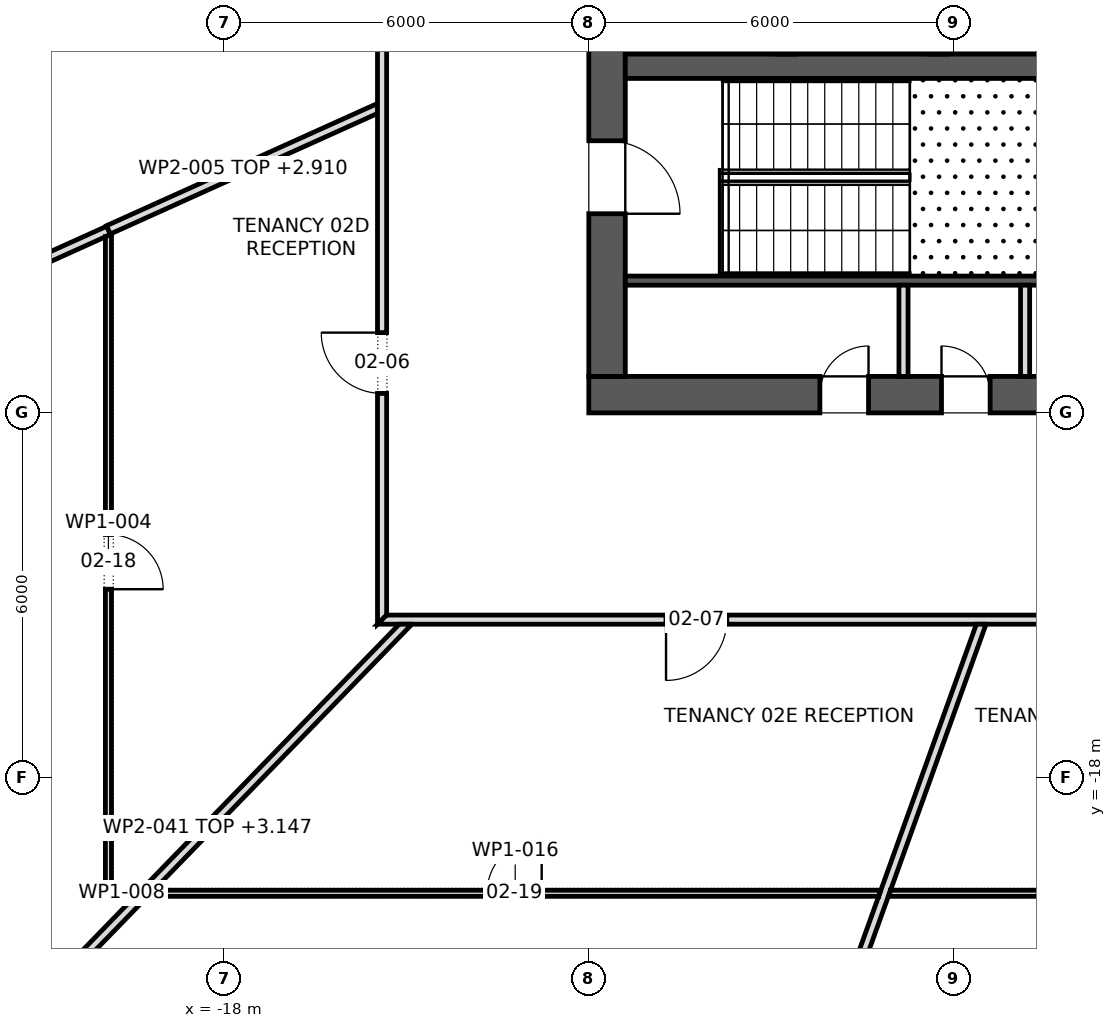
"""IFC4 building model, lengths in metres.
Left out: names, types, materials, properties, quantities, classifications, styles, units other than length and angle.
Written with IfcOpenShell. Run it as: python <this file> out.ifc"""

import sys

from ifc_helpers import new_model, si_unit, direction, frame, frame_2d, origin, place, context, subcontext, project, spatial, polyline, rectangle, outline, extrude, element, fill, save


model = new_model("IFC4")
c1 = context("Model", 3, precision=1e-05, world=origin(), true_north=direction((0.0, 1.0)))
c2 = subcontext(c1, "Body", "Model", "MODEL_VIEW")
j1 = project(units=[si_unit("LENGTHUNIT", "METRE"), si_unit("PLANEANGLEUNIT", "RADIAN")], contexts=[c1])
p1 = place(None, origin())
s1 = spatial("IfcSite", under=j1, at=p1, CompositionType="ELEMENT")
p2 = place(p1, origin())
s2 = spatial("IfcBuilding", under=s1, at=p2, CompositionType="ELEMENT")
p3 = place(p2, frame((0.0, 0.0, 44.5)))
s3 = spatial("IfcBuildingStorey", under=s2, at=p3, CompositionType="ELEMENT", Elevation=44.5)
p4 = place(p3, frame((-12.0, -11.7, 0.0), z_axis=(0.0, 0.0, 1.0), x_axis=(1.0, 0.0, 0.0)))
e1 = element("IfcWall", 1, at=p4, inside=s3, PredefinedType="SHEAR", context=c2, shape_type="SweptSolid", body=[
    extrude(rectangle(XDim=24.0, YDim=0.6, at=frame_2d((12.0, 0.0))), origin(), (0.0, 0.0, 1.0), 4.2),
])
p5 = place(p4, frame((9.975, 0.0, 0.0)))
e2 = element("IfcOpeningElement", 2, at=p5, cuts=e1, PredefinedType="OPENING", context=c2, shape_type="SweptSolid", body=[
    extrude(rectangle(XDim=0.9, YDim=2.1, at=frame_2d((0.45, 1.05))), frame((0.0, 0.312, 0.0), z_axis=(0.0, -1.0, 0.0), x_axis=(1.0, 0.0, 0.0)), (0.0, 0.0, 1.0), 0.624),
])
p6 = place(p4, frame((3.8, 0.0, 0.0)))
e3 = element("IfcOpeningElement", 3, at=p6, cuts=e1, PredefinedType="OPENING", context=c2, shape_type="SweptSolid", body=[
    extrude(rectangle(XDim=0.8, YDim=2.1, at=frame_2d((0.4, 1.05))), frame((0.0, 0.312, 0.0), z_axis=(0.0, -1.0, 0.0), x_axis=(1.0, 0.0, 0.0)), (0.0, 0.0, 1.0), 0.624),
])
p7 = place(p4, frame((5.8, 0.0, 0.0)))
e4 = element("IfcOpeningElement", 4, at=p7, cuts=e1, PredefinedType="OPENING", context=c2, shape_type="SweptSolid", body=[
    extrude(rectangle(XDim=0.8, YDim=2.1, at=frame_2d((0.4, 1.05))), frame((0.0, 0.312, 0.0), z_axis=(0.0, -1.0, 0.0), x_axis=(1.0, 0.0, 0.0)), (0.0, 0.0, 1.0), 0.624),
])
p8 = place(p4, frame((7.5, 0.0, 0.0)))
e5 = element("IfcOpeningElement", 5, at=p8, cuts=e1, PredefinedType="OPENING", context=c2, shape_type="SweptSolid", body=[
    extrude(rectangle(XDim=0.8, YDim=2.1, at=frame_2d((0.4, 1.05))), frame((0.0, 0.312, 0.0), z_axis=(0.0, -1.0, 0.0), x_axis=(1.0, 0.0, 0.0)), (0.0, 0.0, 1.0), 0.624),
])
p9 = place(p4, frame((15.85, 0.0, 0.0)))
e6 = element("IfcOpeningElement", 6, at=p9, cuts=e1, PredefinedType="OPENING", context=c2, shape_type="SweptSolid", body=[
    extrude(rectangle(XDim=0.8, YDim=2.1, at=frame_2d((0.4, 1.05))), frame((0.0, 0.312, 0.0), z_axis=(0.0, -1.0, 0.0), x_axis=(1.0, 0.0, 0.0)), (0.0, 0.0, 1.0), 0.624),
])
p10 = place(p3, frame((-11.7, -11.4, 0.0), z_axis=(0.0, 0.0, 1.0), x_axis=(0.0, 1.0, 0.0)))
e7 = element("IfcWall", 7, at=p10, inside=s3, PredefinedType="SHEAR", context=c2, shape_type="SweptSolid", body=[
    extrude(rectangle(XDim=22.8, YDim=0.6, at=frame_2d((11.4, 0.0))), origin(), (0.0, 0.0, 1.0), 4.2),
])
p11 = place(p10, frame((10.2, 0.0, 0.0)))
e8 = element("IfcOpeningElement", 8, at=p11, cuts=e7, PredefinedType="OPENING", context=c2, shape_type="SweptSolid", body=[
    extrude(rectangle(XDim=2.4, YDim=2.1, at=frame_2d((1.2, 1.05))), frame((0.0, 0.312, 0.0), z_axis=(0.0, -1.0, 0.0), x_axis=(1.0, 0.0, 0.0)), (0.0, 0.0, 1.0), 0.624),
])
p12 = place(p10, frame((18.925, 0.0, 0.0)))
e9 = element("IfcOpeningElement", 9, at=p12, cuts=e7, PredefinedType="OPENING", context=c2, shape_type="SweptSolid", body=[
    extrude(rectangle(XDim=1.2, YDim=2.1, at=frame_2d((0.6, 1.05))), frame((0.0, 0.312, 0.0), z_axis=(0.0, -1.0, 0.0), x_axis=(1.0, 0.0, 0.0)), (0.0, 0.0, 1.0), 0.624),
])
p13 = place(p10, frame((2.675, 0.0, 0.0)))
e10 = element("IfcOpeningElement", 10, at=p13, cuts=e7, PredefinedType="OPENING", context=c2, shape_type="SweptSolid", body=[
    extrude(rectangle(XDim=1.2, YDim=2.1, at=frame_2d((0.6, 1.05))), frame((0.0, 0.312, 0.0), z_axis=(0.0, -1.0, 0.0), x_axis=(1.0, 0.0, 0.0)), (0.0, 0.0, 1.0), 0.624),
])
p14 = place(p3, frame((-11.4, -6.3, 0.0), z_axis=(0.0, 0.0, 1.0), x_axis=(1.0, 0.0, 0.0)))
e11 = element("IfcWall", 11, at=p14, inside=s3, PredefinedType="SHEAR", context=c2, shape_type="SweptSolid", body=[
    extrude(rectangle(XDim=22.8, YDim=0.4, at=frame_2d((11.4, 0.0))), origin(), (0.0, 0.0, 1.0), 4.2),
])
p15 = place(p14, frame((20.85, 0.0, 0.0)))
e12 = element("IfcOpeningElement", 12, at=p15, cuts=e11, PredefinedType="OPENING", context=c2, shape_type="SweptSolid", body=[
    extrude(rectangle(XDim=1.1, YDim=2.1, at=frame_2d((0.55, 1.05))), frame((0.0, 0.212, 0.0), z_axis=(0.0, -1.0, 0.0), x_axis=(1.0, 0.0, 0.0)), (0.0, 0.0, 1.0), 0.424),
])
for number, where, z_axis, x_axis in (
    (13, (-8.75, -6.1, 0.0), (0.0, 0.0, 1.0), (0.0, 1.0, 0.0)),
    (14, (-6.25, -6.1, 0.0), (0.0, 0.0, 1.0), (0.0, 1.0, 0.0)),
):
    element("IfcWall", number, at=place(p3, frame(where, z_axis=z_axis, x_axis=x_axis)), inside=s3, PredefinedType="SHEAR", context=c2, shape_type="SweptSolid", body=[
        extrude(rectangle(XDim=2.9, YDim=0.3, at=frame_2d((1.45, 0.0))), origin(), (0.0, 0.0, 1.0), 4.2),
    ])
p16 = place(p3, frame((-11.4, -9.825, 0.0), z_axis=(0.0, 0.0, 1.0), x_axis=(1.0, 0.0, 0.0)))
e15 = element("IfcWall", 15, at=p16, inside=s3, PredefinedType="SHEAR", context=c2, shape_type="SweptSolid", body=[
    extrude(rectangle(XDim=8.0, YDim=0.15, at=frame_2d((4.0, 0.0))), origin(), (0.0, 0.0, 1.0), 3.9),
])
for number, where, z_axis, x_axis in (
    (16, (-6.825, -11.4, 0.0), (0.0, 0.0, 1.0), (0.0, 1.0, 0.0)),
    (17, (-4.825, -11.4, 0.0), (0.0, 0.0, 1.0), (0.0, 1.0, 0.0)),
):
    element("IfcWall", number, at=place(p3, frame(where, z_axis=z_axis, x_axis=x_axis)), inside=s3, PredefinedType="PARTITIONING", context=c2, shape_type="SweptSolid", body=[
        extrude(rectangle(XDim=1.5, YDim=0.15, at=frame_2d((0.75, 0.0))), origin(), (0.0, 0.0, 1.0), 3.9),
    ])
p17 = place(p3, frame((-30.744, -13.896, 0.0), z_axis=(0.0, 0.0, 1.0), x_axis=(0.91143189519, 0.411450969654, 0.0)))
e18 = element("IfcWall", 18, at=p17, inside=s3, PredefinedType="PARTITIONING", context=c2, shape_type="SweptSolid", body=[
    extrude(outline(polyline([(0.021, -0.075), (1.985, -0.075), (3.95, -0.075), (5.915, -0.075), (7.88, -0.075), (9.845, -0.075), (11.81, -0.075), (11.811, -0.073), (11.815, -0.075), (11.902, -0.075), (11.902, -0.066), (11.902, -0.066), (11.902, 0.062), (11.902, 0.075), (9.919, 0.075), (7.935, 0.075), (5.951, 0.075), (3.968, 0.075), (1.984, 0.075), (0.0, 0.075), (0.0, 0.066), (0.002, -0.001), (0.021, -0.075)])), origin(), (0.0, 0.0, 1.0), 2.91),
])
p18 = place(p3, frame((-19.9, -19.95, 0.0), z_axis=(0.0, 0.0, 1.0), x_axis=(0.0, 1.0, 0.0)))
e19 = element("IfcWall", 19, at=p18, inside=s3, PredefinedType="PARTITIONING", context=c2, shape_type="SweptSolid", body=[
    extrude(outline(polyline([(10.9, -0.05), (10.9, -0.049), (10.892, -0.031), (10.883, -0.034), (10.845, 0.05), (9.038, 0.05), (7.23, 0.05), (5.423, 0.05), (3.615, 0.05), (1.808, 0.05), (0.0, 0.05), (0.1, -0.05), (0.1, -0.05), (1.9, -0.05), (3.7, -0.05), (5.5, -0.05), (7.3, -0.05), (9.1, -0.05), (10.9, -0.05)])), origin(), (0.0, 0.0, 1.0), 3.9),
])
p19 = place(p18, frame((5.05, 0.0, 0.0)))
e20 = element("IfcOpeningElement", 20, at=p19, cuts=e19, PredefinedType="OPENING", context=c2, shape_type="SweptSolid", body=[
    extrude(rectangle(XDim=0.9, YDim=2.1, at=frame_2d((0.45, 1.05))), frame((0.0, 0.062, 0.0), z_axis=(0.0, -1.0, 0.0), x_axis=(1.0, 0.0, 0.0)), (0.0, 0.0, 1.0), 0.124),
])
p20 = place(p3, frame((-19.9, -8.99, 0.0), z_axis=(0.0, 0.0, 1.0), x_axis=(0.911546381607, 0.411197269178, 0.0)))
e21 = element("IfcWall", 21, at=p20, inside=s3, PredefinedType="PARTITIONING", context=c2, shape_type="SweptSolid", body=[
    extrude(outline(polyline([(0.02, -0.075), (1.62, -0.075), (3.22, -0.075), (4.821, -0.075), (4.888, 0.075), (3.259, 0.075), (1.629, 0.075), (0.0, 0.075), (0.0, -0.066), (0.02, -0.075)])), origin(), (0.0, 0.0, 1.0), 2.91),
])
p21 = place(p3, frame((-19.46, -19.9, 0.0), z_axis=(0.0, 0.0, 1.0), x_axis=(-1.0, 0.0, 0.0)))
e22 = element("IfcWall", 22, at=p21, inside=s3, PredefinedType="PARTITIONING", context=c2, shape_type="SweptSolid", body=[
    extrude(outline(polyline([(0.0, -0.05), (0.39, -0.05), (0.49, 0.05), (0.0, 0.05), (0.0, -0.05)])), origin(), (0.0, 0.0, 1.0), 3.9),
])
p22 = place(p3, frame((-15.4, -15.475, 0.0), z_axis=(0.0, 0.0, 1.0), x_axis=(0.0, 1.0, 0.0)))
e23 = element("IfcWall", 23, at=p22, inside=s3, PredefinedType="PARTITIONING", context=c2, shape_type="SweptSolid", body=[
    extrude(outline(polyline([(0.15, -0.075), (2.066, -0.075), (3.981, -0.075), (5.897, -0.075), (7.812, -0.075), (9.728, -0.075), (11.644, -0.075), (13.56, -0.075), (15.475, -0.075), (17.391, -0.075), (19.306, -0.075), (21.222, -0.075), (23.138, -0.075), (25.053, -0.075), (26.969, -0.075), (28.885, -0.075), (30.8, -0.075), (30.95, 0.075), (29.016, 0.075), (27.081, 0.075), (25.147, 0.075), (23.212, 0.075), (21.278, 0.075), (19.344, 0.075), (17.409, 0.075), (15.475, 0.075), (13.541, 0.075), (11.606, 0.075), (9.672, 0.075), (7.738, 0.075), (5.803, 0.075), (3.869, 0.075), (1.935, 0.075), (0.0, 0.075), (0.15, -0.075)])), origin(), (0.0, 0.0, 1.0), 3.9),
])
p23 = place(p22, frame((28.02, 0.0, 0.0)))
e24 = element("IfcOpeningElement", 24, at=p23, cuts=e23, PredefinedType="OPENING", context=c2, shape_type="SweptSolid", body=[
    extrude(rectangle(XDim=1.0, YDim=2.1, at=frame_2d((0.5, 1.05))), frame((0.0, 0.087, 0.0), z_axis=(0.0, -1.0, 0.0), x_axis=(1.0, 0.0, 0.0)), (0.0, 0.0, 1.0), 0.174),
])
p24 = place(p22, frame((21.895, 0.0, 0.0)))
e25 = element("IfcOpeningElement", 25, at=p24, cuts=e23, PredefinedType="OPENING", context=c2, shape_type="SweptSolid", body=[
    extrude(rectangle(XDim=1.8, YDim=2.1, at=frame_2d((0.9, 1.05))), frame((0.0, 0.087, 0.0), z_axis=(0.0, -1.0, 0.0), x_axis=(1.0, 0.0, 0.0)), (0.0, 0.0, 1.0), 0.174),
])
p25 = place(p22, frame((15.798, 0.0, 0.0)))
e26 = element("IfcOpeningElement", 26, at=p25, cuts=e23, PredefinedType="OPENING", context=c2, shape_type="SweptSolid", body=[
    extrude(rectangle(XDim=1.8, YDim=2.1, at=frame_2d((0.9, 1.05))), frame((0.0, 0.087, 0.0), z_axis=(0.0, -1.0, 0.0), x_axis=(1.0, 0.0, 0.0)), (0.0, 0.0, 1.0), 0.174),
])
p26 = place(p22, frame((10.343, 0.0, 0.0)))
e27 = element("IfcOpeningElement", 27, at=p26, cuts=e23, PredefinedType="OPENING", context=c2, shape_type="SweptSolid", body=[
    extrude(rectangle(XDim=1.8, YDim=2.1, at=frame_2d((0.9, 1.05))), frame((0.0, 0.087, 0.0), z_axis=(0.0, -1.0, 0.0), x_axis=(1.0, 0.0, 0.0)), (0.0, 0.0, 1.0), 0.174),
])
p27 = place(p22, frame((3.795, 0.0, 0.0)))
e28 = element("IfcOpeningElement", 28, at=p27, cuts=e23, PredefinedType="OPENING", context=c2, shape_type="SweptSolid", body=[
    extrude(rectangle(XDim=1.0, YDim=2.1, at=frame_2d((0.5, 1.05))), frame((0.0, 0.087, 0.0), z_axis=(0.0, -1.0, 0.0), x_axis=(1.0, 0.0, 0.0)), (0.0, 0.0, 1.0), 0.174),
])
p28 = place(p3, frame((-15.475, -15.4, 0.0), z_axis=(0.0, 0.0, 1.0), x_axis=(1.0, 0.0, 0.0)))
e29 = element("IfcWall", 29, at=p28, inside=s3, PredefinedType="PARTITIONING", context=c2, shape_type="SweptSolid", body=[
    extrude(outline(polyline([(0.0, -0.075), (1.935, -0.075), (3.869, -0.075), (5.803, -0.075), (7.738, -0.075), (9.672, -0.075), (11.606, -0.075), (13.541, -0.075), (15.475, -0.075), (17.409, -0.075), (19.344, -0.075), (21.278, -0.075), (23.212, -0.075), (25.147, -0.075), (27.081, -0.075), (29.016, -0.075), (30.95, -0.075), (30.8, 0.075), (28.885, 0.075), (26.969, 0.075), (25.053, 0.075), (23.138, 0.075), (21.222, 0.075), (19.306, 0.075), (17.391, 0.075), (15.475, 0.075), (13.56, 0.075), (11.644, 0.075), (9.728, 0.075), (7.812, 0.075), (5.897, 0.075), (3.981, 0.075), (2.066, 0.075), (0.15, 0.075), (0.0, -0.075)])), origin(), (0.0, 0.0, 1.0), 3.9),
])
p29 = place(p28, frame((4.745, 0.0, 0.0)))
e30 = element("IfcOpeningElement", 30, at=p29, cuts=e29, PredefinedType="OPENING", context=c2, shape_type="SweptSolid", body=[
    extrude(rectangle(XDim=1.0, YDim=2.1, at=frame_2d((0.5, 1.05))), frame((0.0, 0.087, 0.0), z_axis=(0.0, -1.0, 0.0), x_axis=(1.0, 0.0, 0.0)), (0.0, 0.0, 1.0), 0.174),
])
p30 = place(p28, frame((13.11, 0.0, 0.0)))
e31 = element("IfcOpeningElement", 31, at=p30, cuts=e29, PredefinedType="OPENING", context=c2, shape_type="SweptSolid", body=[
    extrude(rectangle(XDim=1.0, YDim=2.1, at=frame_2d((0.5, 1.05))), frame((0.0, 0.087, 0.0), z_axis=(0.0, -1.0, 0.0), x_axis=(1.0, 0.0, 0.0)), (0.0, 0.0, 1.0), 0.174),
])
p31 = place(p28, frame((20.735, 0.0, 0.0)))
e32 = element("IfcOpeningElement", 32, at=p31, cuts=e29, PredefinedType="OPENING", context=c2, shape_type="SweptSolid", body=[
    extrude(rectangle(XDim=1.0, YDim=2.1, at=frame_2d((0.5, 1.05))), frame((0.0, 0.087, 0.0), z_axis=(0.0, -1.0, 0.0), x_axis=(1.0, 0.0, 0.0)), (0.0, 0.0, 1.0), 0.174),
])
p32 = place(p28, frame((27.54, 0.0, 0.0)))
e33 = element("IfcOpeningElement", 33, at=p32, cuts=e29, PredefinedType="OPENING", context=c2, shape_type="SweptSolid", body=[
    extrude(rectangle(XDim=1.0, YDim=2.1, at=frame_2d((0.5, 1.05))), frame((0.0, 0.087, 0.0), z_axis=(0.0, -1.0, 0.0), x_axis=(1.0, 0.0, 0.0)), (0.0, 0.0, 1.0), 0.174),
])
p33 = place(p3, frame((-10.119, -28.209, 0.0), z_axis=(0.0, 0.0, 1.0), x_axis=(0.337949016046, 0.941164418448, 0.0)))
e34 = element("IfcWall", 34, at=p33, inside=s3, PredefinedType="PARTITIONING", context=c2, shape_type="SweptSolid", body=[
    extrude(outline(polyline([(0.014, -0.075), (1.792, -0.075), (3.57, -0.075), (5.347, -0.075), (7.125, -0.075), (8.903, -0.075), (8.908, -0.073), (8.909, -0.075), (10.458, -0.075), (12.008, -0.075), (13.557, -0.075), (13.557, -0.074), (13.555, -0.069), (13.555, -0.069), (13.503, 0.075), (11.919, 0.075), (10.335, 0.075), (8.751, 0.075), (8.749, 0.074), (8.749, 0.075), (6.999, 0.075), (5.249, 0.075), (3.5, 0.075), (1.75, 0.075), (0.0, 0.075), (0.0, 0.071), (0.0, -0.0), (0.014, -0.075)])), origin(), (0.0, 0.0, 1.0), 2.91),
])
p34 = place(p3, frame((-7.198, -19.9, 0.0), z_axis=(0.0, 0.0, 1.0), x_axis=(-1.0, 0.0, 0.0)))
e35 = element("IfcWall", 35, at=p34, inside=s3, PredefinedType="PARTITIONING", context=c2, shape_type="SweptSolid", body=[
    extrude(outline(polyline([(0.0, -0.05), (1.993, -0.05), (3.986, -0.05), (5.979, -0.05), (7.972, -0.05), (9.965, -0.05), (11.958, -0.05), (12.055, 0.05), (12.055, 0.05), (10.338, 0.05), (8.621, 0.05), (6.904, 0.05), (5.187, 0.05), (3.47, 0.05), (1.753, 0.05), (0.035, 0.05), (0.0, -0.049), (0.0, -0.05)])), origin(), (0.0, 0.0, 1.0), 3.9),
])
p35 = place(p34, frame((5.577, 0.0, 0.0)))
e36 = element("IfcOpeningElement", 36, at=p35, cuts=e35, PredefinedType="OPENING", context=c2, shape_type="SweptSolid", body=[
    extrude(rectangle(XDim=0.9, YDim=2.1, at=frame_2d((0.45, 1.05))), frame((0.0, 0.062, 0.0), z_axis=(0.0, -1.0, 0.0), x_axis=(1.0, 0.0, 0.0)), (0.0, 0.0, 1.0), 0.124),
])
p36 = place(p3, frame((2.25, -19.9, 0.0), z_axis=(0.0, 0.0, 1.0), x_axis=(-1.0, 0.0, 0.0)))
e37 = element("IfcWall", 37, at=p36, inside=s3, PredefinedType="PARTITIONING", context=c2, shape_type="SweptSolid", body=[
    extrude(outline(polyline([(0.021, -0.05), (1.875, -0.05), (3.728, -0.05), (5.581, -0.05), (7.435, -0.05), (9.288, -0.05), (9.324, 0.05), (9.324, 0.05), (7.459, 0.05), (5.594, 0.05), (3.729, 0.05), (1.865, 0.05), (0.0, 0.05), (0.0, 0.047), (0.01, -0.041), (0.0, -0.042), (0.0, -0.043), (0.02, -0.041), (0.021, -0.05)])), origin(), (0.0, 0.0, 1.0), 3.9),
])
p37 = place(p36, frame((4.215, 0.0, 0.0)))
e38 = element("IfcOpeningElement", 38, at=p37, cuts=e37, PredefinedType="OPENING", context=c2, shape_type="SweptSolid", body=[
    extrude(rectangle(XDim=0.9, YDim=2.1, at=frame_2d((0.45, 1.05))), frame((0.0, 0.062, 0.0), z_axis=(0.0, -1.0, 0.0), x_axis=(1.0, 0.0, 0.0)), (0.0, 0.0, 1.0), 0.124),
])
p38 = place(p3, frame((-21.537, -22.194, 0.0), z_axis=(0.0, 0.0, 1.0), x_axis=(0.696644213118, 0.71741678286, 0.0)))
e39 = element("IfcWall", 39, at=p38, inside=s3, PredefinedType="PARTITIONING", context=c2, shape_type="SweptSolid", body=[
    extrude(outline(polyline([(0.0, -0.075), (1.667, -0.075), (3.335, -0.075), (3.337, -0.073), (3.34, -0.075), (4.864, -0.075), (6.389, -0.075), (7.913, -0.075), (9.438, -0.075), (9.438, -0.074), (9.345, 0.021), (9.345, 0.021), (9.292, 0.075), (7.734, 0.075), (6.176, 0.075), (4.617, 0.075), (3.059, 0.075), (3.057, 0.073), (3.055, 0.075), (1.527, 0.075), (0.0, 0.075), (0.0, -0.075)])), origin(), (0.0, 0.0, 1.0), 3.147),
])
p39 = place(p13, frame((1.2, 0.0, 0.0), z_axis=(0.0, 0.0, 1.0), x_axis=(-1.0, 0.0, 0.0)))
e40 = element("IfcDoor", 40, at=p39, inside=s3, OperationType="SINGLE_SWING_LEFT", PredefinedType="DOOR", context=c2, shape_type="SweptSolid", body=[
    extrude(rectangle(XDim=1.2, YDim=2.1, at=frame_2d((0.6, 1.05))), frame((0.0, 0.025, 0.0), z_axis=(0.0, -1.0, 0.0), x_axis=(1.0, 0.0, 0.0)), (0.0, 0.0, 1.0), 0.05),
])
fill(e10, e40)
p40 = place(p6, origin())
e41 = element("IfcDoor", 41, at=p40, inside=s3, OperationType="SINGLE_SWING_LEFT", PredefinedType="DOOR", context=c2, shape_type="SweptSolid", body=[
    extrude(rectangle(XDim=0.8, YDim=2.1, at=frame_2d((0.4, 1.05))), frame((0.0, 0.025, 0.0), z_axis=(0.0, -1.0, 0.0), x_axis=(1.0, 0.0, 0.0)), (0.0, 0.0, 1.0), 0.05),
])
fill(e3, e41)
p41 = place(p7, origin())
e42 = element("IfcDoor", 42, at=p41, inside=s3, OperationType="SINGLE_SWING_RIGHT", PredefinedType="DOOR", context=c2, shape_type="SweptSolid", body=[
    extrude(rectangle(XDim=0.8, YDim=2.1, at=frame_2d((0.4, 1.05))), frame((0.0, 0.025, 0.0), z_axis=(0.0, -1.0, 0.0), x_axis=(1.0, 0.0, 0.0)), (0.0, 0.0, 1.0), 0.05),
])
fill(e4, e42)
p42 = place(p27, origin())
e43 = element("IfcDoor", 43, at=p42, inside=s3, OperationType="SINGLE_SWING_LEFT", PredefinedType="DOOR", context=c2, shape_type="SweptSolid", body=[
    extrude(rectangle(XDim=1.0, YDim=2.1, at=frame_2d((0.5, 1.05))), frame((0.0, 0.025, 0.0), z_axis=(0.0, -1.0, 0.0), x_axis=(1.0, 0.0, 0.0)), (0.0, 0.0, 1.0), 0.05),
])
fill(e28, e43)
p43 = place(p29, frame((1.0, 0.0, 0.0), z_axis=(0.0, 0.0, 1.0), x_axis=(-1.0, 0.0, 0.0)))
e44 = element("IfcDoor", 44, at=p43, inside=s3, OperationType="SINGLE_SWING_LEFT", PredefinedType="DOOR", context=c2, shape_type="SweptSolid", body=[
    extrude(rectangle(XDim=1.0, YDim=2.1, at=frame_2d((0.5, 1.05))), frame((0.0, 0.025, 0.0), z_axis=(0.0, -1.0, 0.0), x_axis=(1.0, 0.0, 0.0)), (0.0, 0.0, 1.0), 0.05),
])
fill(e30, e44)
p44 = place(p19, frame((0.9, 0.0, 0.0), z_axis=(0.0, 0.0, 1.0), x_axis=(-1.0, 0.0, 0.0)))
e45 = element("IfcDoor", 45, at=p44, inside=s3, OperationType="SINGLE_SWING_LEFT", PredefinedType="DOOR", context=c2, shape_type="SweptSolid", body=[
    extrude(rectangle(XDim=0.9, YDim=2.1, at=frame_2d((0.45, 1.05))), frame((0.0, 0.025, 0.0), z_axis=(0.0, -1.0, 0.0), x_axis=(1.0, 0.0, 0.0)), (0.0, 0.0, 1.0), 0.05),
])
fill(e20, e45)
p45 = place(p35, frame((0.9, 0.0, 0.0), z_axis=(0.0, 0.0, 1.0), x_axis=(-1.0, 0.0, 0.0)))
e46 = element("IfcDoor", 46, at=p45, inside=s3, OperationType="SINGLE_SWING_LEFT", PredefinedType="DOOR", context=c2, shape_type="SweptSolid", body=[
    extrude(rectangle(XDim=0.9, YDim=2.1, at=frame_2d((0.45, 1.05))), frame((0.0, 0.025, 0.0), z_axis=(0.0, -1.0, 0.0), x_axis=(1.0, 0.0, 0.0)), (0.0, 0.0, 1.0), 0.05),
])
fill(e36, e46)
save(model, sys.argv[1])
